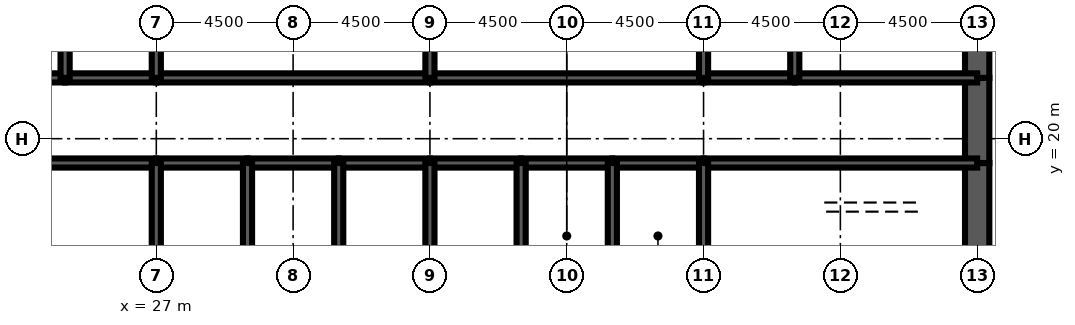
"""IFC4 building model, lengths in metres.
Left out: names, types, materials, properties, quantities, classifications, styles, units other than length and angle.
Written with IfcOpenShell. Run it as: python <this file> out.ifc"""

import sys

from ifc_helpers import new_model, si_unit, direction, frame, frame_2d, origin, place, context, subcontext, project, spatial, rectangle, extrude, element, fill, save


model = new_model("IFC4")
c1 = context("Model", 3, precision=1e-05, world=origin(), true_north=direction((0.0, 1.0)))
c2 = subcontext(c1, "Body", "Model", "MODEL_VIEW")
j1 = project(units=[si_unit("LENGTHUNIT", "METRE"), si_unit("PLANEANGLEUNIT", "RADIAN")], contexts=[c1])
p1 = place(None, origin())
s1 = spatial("IfcSite", under=j1, at=p1, CompositionType="ELEMENT")
p2 = place(p1, origin())
s2 = spatial("IfcBuilding", under=s1, at=p2, CompositionType="ELEMENT")
p3 = place(p2, frame((0.0, 0.0, 202.6)))
s3 = spatial("IfcBuildingStorey", under=s2, at=p3, CompositionType="ELEMENT", Elevation=202.6)
p4 = place(p3, frame((54.0, 16.0, 0.0), z_axis=(0.0, 0.0, 1.0), x_axis=(0.0, 1.0, 0.0)))
e1 = element("IfcWall", 1, at=p4, inside=s3, PredefinedType="SHEAR", context=c2, shape_type="SweptSolid", body=[
    extrude(rectangle(XDim=3.2, YDim=0.8, at=frame_2d((1.6, 0.0))), origin(), (0.0, 0.0, 1.0), 4.2),
])
p5 = place(p3, frame((54.0, 19.2, 0.0), z_axis=(0.0, 0.0, 1.0), x_axis=(0.0, 1.0, 0.0)))
e2 = element("IfcWall", 2, at=p5, inside=s3, PredefinedType="SHEAR", context=c2, shape_type="SweptSolid", body=[
    extrude(rectangle(XDim=2.8, YDim=0.8, at=frame_2d((1.4, 0.0))), origin(), (0.0, 0.0, 1.0), 4.2),
])
p6 = place(p5, frame((0.4, 0.0, 0.0)))
e3 = element("IfcOpeningElement", 3, at=p6, cuts=e2, PredefinedType="OPENING", context=c2, shape_type="SweptSolid", body=[
    extrude(rectangle(XDim=1.8, YDim=2.1, at=frame_2d((0.9, 1.05))), frame((0.0, 0.41, 0.0), z_axis=(0.0, -1.0, 0.0), x_axis=(1.0, 0.0, 0.0)), (0.0, 0.0, 1.0), 0.82),
])
p7 = place(p3, frame((54.0, 22.0, 0.0), z_axis=(0.0, 0.0, 1.0), x_axis=(0.0, 1.0, 0.0)))
e4 = element("IfcWall", 4, at=p7, inside=s3, PredefinedType="SHEAR", context=c2, shape_type="SweptSolid", body=[
    extrude(rectangle(XDim=4.0, YDim=0.8, at=frame_2d((2.0, 0.0))), origin(), (0.0, 0.0, 1.0), 4.2),
])
p8 = place(p3, frame((18.0, 19.2, 0.0), z_axis=(0.0, 0.0, 1.0), x_axis=(1.0, 0.0, 0.0)))
e5 = element("IfcWall", 5, at=p8, inside=s3, PredefinedType="SOLIDWALL", context=c2, shape_type="SweptSolid", body=[
    extrude(rectangle(XDim=9.0, YDim=0.3, at=frame_2d((4.5, 0.0))), origin(), (0.0, 0.0, 1.0), 4.2),
])
p9 = place(p8, frame((0.65, 0.0, 0.0)))
e6 = element("IfcOpeningElement", 6, at=p9, cuts=e5, PredefinedType="OPENING", context=c2, shape_type="SweptSolid", body=[
    extrude(rectangle(XDim=1.0, YDim=2.1, at=frame_2d((0.5, 1.05))), frame((0.0, 0.16, 0.0), z_axis=(0.0, -1.0, 0.0), x_axis=(1.0, 0.0, 0.0)), (0.0, 0.0, 1.0), 0.32),
])
p10 = place(p3, frame((27.0, 19.2, 0.0), z_axis=(0.0, 0.0, 1.0), x_axis=(1.0, 0.0, 0.0)))
e7 = element("IfcWall", 7, at=p10, inside=s3, PredefinedType="SOLIDWALL", context=c2, shape_type="SweptSolid", body=[
    extrude(rectangle(XDim=3.0, YDim=0.3, at=frame_2d((1.5, 0.0))), origin(), (0.0, 0.0, 1.0), 4.2),
])
p11 = place(p10, frame((0.95, 0.0, 0.0)))
e8 = element("IfcOpeningElement", 8, at=p11, cuts=e7, PredefinedType="OPENING", context=c2, shape_type="SweptSolid", body=[
    extrude(rectangle(XDim=1.1, YDim=2.2, at=frame_2d((0.55, 1.1))), frame((0.0, 0.16, 0.0), z_axis=(0.0, -1.0, 0.0), x_axis=(1.0, 0.0, 0.0)), (0.0, 0.0, 1.0), 0.32),
])
p12 = place(p3, frame((30.0, 19.2, 0.0), z_axis=(0.0, 0.0, 1.0), x_axis=(1.0, 0.0, 0.0)))
e9 = element("IfcWall", 9, at=p12, inside=s3, PredefinedType="SOLIDWALL", context=c2, shape_type="SweptSolid", body=[
    extrude(rectangle(XDim=3.0, YDim=0.3, at=frame_2d((1.5, 0.0))), origin(), (0.0, 0.0, 1.0), 4.2),
])
p13 = place(p12, frame((0.95, 0.0, 0.0)))
e10 = element("IfcOpeningElement", 10, at=p13, cuts=e9, PredefinedType="OPENING", context=c2, shape_type="SweptSolid", body=[
    extrude(rectangle(XDim=1.1, YDim=2.2, at=frame_2d((0.55, 1.1))), frame((0.0, 0.16, 0.0), z_axis=(0.0, -1.0, 0.0), x_axis=(1.0, 0.0, 0.0)), (0.0, 0.0, 1.0), 0.32),
])
p14 = place(p3, frame((33.0, 19.2, 0.0), z_axis=(0.0, 0.0, 1.0), x_axis=(1.0, 0.0, 0.0)))
e11 = element("IfcWall", 11, at=p14, inside=s3, PredefinedType="SOLIDWALL", context=c2, shape_type="SweptSolid", body=[
    extrude(rectangle(XDim=3.0, YDim=0.3, at=frame_2d((1.5, 0.0))), origin(), (0.0, 0.0, 1.0), 4.2),
])
p15 = place(p14, frame((0.95, 0.0, 0.0)))
e12 = element("IfcOpeningElement", 12, at=p15, cuts=e11, PredefinedType="OPENING", context=c2, shape_type="SweptSolid", body=[
    extrude(rectangle(XDim=1.1, YDim=2.2, at=frame_2d((0.55, 1.1))), frame((0.0, 0.16, 0.0), z_axis=(0.0, -1.0, 0.0), x_axis=(1.0, 0.0, 0.0)), (0.0, 0.0, 1.0), 0.32),
])
p16 = place(p3, frame((36.0, 19.2, 0.0), z_axis=(0.0, 0.0, 1.0), x_axis=(1.0, 0.0, 0.0)))
e13 = element("IfcWall", 13, at=p16, inside=s3, PredefinedType="SOLIDWALL", context=c2, shape_type="SweptSolid", body=[
    extrude(rectangle(XDim=3.0, YDim=0.3, at=frame_2d((1.5, 0.0))), origin(), (0.0, 0.0, 1.0), 4.2),
])
p17 = place(p16, frame((0.95, 0.0, 0.0)))
e14 = element("IfcOpeningElement", 14, at=p17, cuts=e13, PredefinedType="OPENING", context=c2, shape_type="SweptSolid", body=[
    extrude(rectangle(XDim=1.1, YDim=2.2, at=frame_2d((0.55, 1.1))), frame((0.0, 0.16, 0.0), z_axis=(0.0, -1.0, 0.0), x_axis=(1.0, 0.0, 0.0)), (0.0, 0.0, 1.0), 0.32),
])
p18 = place(p3, frame((39.0, 19.2, 0.0), z_axis=(0.0, 0.0, 1.0), x_axis=(1.0, 0.0, 0.0)))
e15 = element("IfcWall", 15, at=p18, inside=s3, PredefinedType="SOLIDWALL", context=c2, shape_type="SweptSolid", body=[
    extrude(rectangle(XDim=3.0, YDim=0.3, at=frame_2d((1.5, 0.0))), origin(), (0.0, 0.0, 1.0), 4.2),
])
p19 = place(p18, frame((1.0, 0.0, 0.0)))
e16 = element("IfcOpeningElement", 16, at=p19, cuts=e15, PredefinedType="OPENING", context=c2, shape_type="SweptSolid", body=[
    extrude(rectangle(XDim=1.0, YDim=2.1, at=frame_2d((0.5, 1.05))), frame((0.0, 0.16, 0.0), z_axis=(0.0, -1.0, 0.0), x_axis=(1.0, 0.0, 0.0)), (0.0, 0.0, 1.0), 0.32),
])
p20 = place(p3, frame((42.0, 19.2, 0.0), z_axis=(0.0, 0.0, 1.0), x_axis=(1.0, 0.0, 0.0)))
e17 = element("IfcWall", 17, at=p20, inside=s3, PredefinedType="SOLIDWALL", context=c2, shape_type="SweptSolid", body=[
    extrude(rectangle(XDim=3.0, YDim=0.3, at=frame_2d((1.5, 0.0))), origin(), (0.0, 0.0, 1.0), 4.2),
])
p21 = place(p20, frame((1.0, 0.0, 0.0)))
e18 = element("IfcOpeningElement", 18, at=p21, cuts=e17, PredefinedType="OPENING", context=c2, shape_type="SweptSolid", body=[
    extrude(rectangle(XDim=1.0, YDim=2.1, at=frame_2d((0.5, 1.05))), frame((0.0, 0.16, 0.0), z_axis=(0.0, -1.0, 0.0), x_axis=(1.0, 0.0, 0.0)), (0.0, 0.0, 1.0), 0.32),
])
p22 = place(p3, frame((45.0, 19.2, 0.0), z_axis=(0.0, 0.0, 1.0), x_axis=(1.0, 0.0, 0.0)))
e19 = element("IfcWall", 19, at=p22, inside=s3, PredefinedType="SOLIDWALL", context=c2, shape_type="SweptSolid", body=[
    extrude(rectangle(XDim=9.0, YDim=0.3, at=frame_2d((4.5, 0.0))), origin(), (0.0, 0.0, 1.0), 4.2),
])
p23 = place(p22, frame((7.35, 0.0, 0.0)))
e20 = element("IfcOpeningElement", 20, at=p23, cuts=e19, PredefinedType="OPENING", context=c2, shape_type="SweptSolid", body=[
    extrude(rectangle(XDim=1.0, YDim=2.1, at=frame_2d((0.5, 1.05))), frame((0.0, 0.16, 0.0), z_axis=(0.0, -1.0, 0.0), x_axis=(1.0, 0.0, 0.0)), (0.0, 0.0, 1.0), 0.32),
])
p24 = place(p3, frame((18.0, 22.0, 0.0), z_axis=(0.0, 0.0, 1.0), x_axis=(1.0, 0.0, 0.0)))
e21 = element("IfcWall", 21, at=p24, inside=s3, PredefinedType="SOLIDWALL", context=c2, shape_type="SweptSolid", body=[
    extrude(rectangle(XDim=6.0, YDim=0.3, at=frame_2d((3.0, 0.0))), origin(), (0.0, 0.0, 1.0), 4.2),
])
p25 = place(p24, frame((4.4, 0.0, 0.0)))
e22 = element("IfcOpeningElement", 22, at=p25, cuts=e21, PredefinedType="OPENING", context=c2, shape_type="SweptSolid", body=[
    extrude(rectangle(XDim=1.0, YDim=2.1, at=frame_2d((0.5, 1.05))), frame((0.0, 0.16, 0.0), z_axis=(0.0, -1.0, 0.0), x_axis=(1.0, 0.0, 0.0)), (0.0, 0.0, 1.0), 0.32),
])
p26 = place(p24, frame((0.65, 0.0, 0.0)))
e23 = element("IfcOpeningElement", 23, at=p26, cuts=e21, PredefinedType="OPENING", context=c2, shape_type="SweptSolid", body=[
    extrude(rectangle(XDim=1.0, YDim=2.1, at=frame_2d((0.5, 1.05))), frame((0.0, 0.16, 0.0), z_axis=(0.0, -1.0, 0.0), x_axis=(1.0, 0.0, 0.0)), (0.0, 0.0, 1.0), 0.32),
])
p27 = place(p3, frame((24.0, 22.0, 0.0), z_axis=(0.0, 0.0, 1.0), x_axis=(1.0, 0.0, 0.0)))
e24 = element("IfcWall", 24, at=p27, inside=s3, PredefinedType="SOLIDWALL", context=c2, shape_type="SweptSolid", body=[
    extrude(rectangle(XDim=3.0, YDim=0.3, at=frame_2d((1.5, 0.0))), origin(), (0.0, 0.0, 1.0), 4.2),
])
p28 = place(p27, frame((1.0, 0.0, 0.0)))
e25 = element("IfcOpeningElement", 25, at=p28, cuts=e24, PredefinedType="OPENING", context=c2, shape_type="SweptSolid", body=[
    extrude(rectangle(XDim=1.0, YDim=2.1, at=frame_2d((0.5, 1.05))), frame((0.0, 0.16, 0.0), z_axis=(0.0, -1.0, 0.0), x_axis=(1.0, 0.0, 0.0)), (0.0, 0.0, 1.0), 0.32),
])
p29 = place(p3, frame((27.0, 22.0, 0.0), z_axis=(0.0, 0.0, 1.0), x_axis=(1.0, 0.0, 0.0)))
e26 = element("IfcWall", 26, at=p29, inside=s3, PredefinedType="SOLIDWALL", context=c2, shape_type="SweptSolid", body=[
    extrude(rectangle(XDim=9.0, YDim=0.3, at=frame_2d((4.5, 0.0))), origin(), (0.0, 0.0, 1.0), 4.2),
])
p30 = place(p29, frame((4.0, 0.0, 0.0)))
e27 = element("IfcOpeningElement", 27, at=p30, cuts=e26, PredefinedType="OPENING", context=c2, shape_type="SweptSolid", body=[
    extrude(rectangle(XDim=1.0, YDim=2.1, at=frame_2d((0.5, 1.05))), frame((0.0, 0.16, 0.0), z_axis=(0.0, -1.0, 0.0), x_axis=(1.0, 0.0, 0.0)), (0.0, 0.0, 1.0), 0.32),
])
p31 = place(p3, frame((36.0, 22.0, 0.0), z_axis=(0.0, 0.0, 1.0), x_axis=(1.0, 0.0, 0.0)))
e28 = element("IfcWall", 28, at=p31, inside=s3, PredefinedType="SOLIDWALL", context=c2, shape_type="SweptSolid", body=[
    extrude(rectangle(XDim=9.0, YDim=0.3, at=frame_2d((4.5, 0.0))), origin(), (0.0, 0.0, 1.0), 4.2),
])
p32 = place(p31, frame((4.0, 0.0, 0.0)))
e29 = element("IfcOpeningElement", 29, at=p32, cuts=e28, PredefinedType="OPENING", context=c2, shape_type="SweptSolid", body=[
    extrude(rectangle(XDim=1.0, YDim=2.1, at=frame_2d((0.5, 1.05))), frame((0.0, 0.16, 0.0), z_axis=(0.0, -1.0, 0.0), x_axis=(1.0, 0.0, 0.0)), (0.0, 0.0, 1.0), 0.32),
])
p33 = place(p3, frame((45.0, 22.0, 0.0), z_axis=(0.0, 0.0, 1.0), x_axis=(1.0, 0.0, 0.0)))
e30 = element("IfcWall", 30, at=p33, inside=s3, PredefinedType="SOLIDWALL", context=c2, shape_type="SweptSolid", body=[
    extrude(rectangle(XDim=3.0, YDim=0.3, at=frame_2d((1.5, 0.0))), origin(), (0.0, 0.0, 1.0), 4.2),
])
p34 = place(p33, frame((1.0, 0.0, 0.0)))
e31 = element("IfcOpeningElement", 31, at=p34, cuts=e30, PredefinedType="OPENING", context=c2, shape_type="SweptSolid", body=[
    extrude(rectangle(XDim=1.0, YDim=2.1, at=frame_2d((0.5, 1.05))), frame((0.0, 0.16, 0.0), z_axis=(0.0, -1.0, 0.0), x_axis=(1.0, 0.0, 0.0)), (0.0, 0.0, 1.0), 0.32),
])
p35 = place(p3, frame((48.0, 22.0, 0.0), z_axis=(0.0, 0.0, 1.0), x_axis=(1.0, 0.0, 0.0)))
e32 = element("IfcWall", 32, at=p35, inside=s3, PredefinedType="SOLIDWALL", context=c2, shape_type="SweptSolid", body=[
    extrude(rectangle(XDim=6.0, YDim=0.3, at=frame_2d((3.0, 0.0))), origin(), (0.0, 0.0, 1.0), 4.2),
])
p36 = place(p35, frame((2.0, 0.0, 0.0)))
e33 = element("IfcOpeningElement", 33, at=p36, cuts=e32, PredefinedType="OPENING", context=c2, shape_type="SweptSolid", body=[
    extrude(rectangle(XDim=1.0, YDim=2.1, at=frame_2d((0.5, 1.05))), frame((0.0, 0.16, 0.0), z_axis=(0.0, -1.0, 0.0), x_axis=(1.0, 0.0, 0.0)), (0.0, 0.0, 1.0), 0.32),
])
p37 = place(p35, frame((4.35, 0.0, 0.0)))
e34 = element("IfcOpeningElement", 34, at=p37, cuts=e32, PredefinedType="OPENING", context=c2, shape_type="SweptSolid", body=[
    extrude(rectangle(XDim=1.0, YDim=2.1, at=frame_2d((0.5, 1.05))), frame((0.0, 0.16, 0.0), z_axis=(0.0, -1.0, 0.0), x_axis=(1.0, 0.0, 0.0)), (0.0, 0.0, 1.0), 0.32),
])
for number, where, z_axis, x_axis in (
    (35, (27.0, 16.0, 0.0), (0.0, 0.0, 1.0), (0.0, 1.0, 0.0)),
    (36, (30.0, 16.0, 0.0), (0.0, 0.0, 1.0), (0.0, 1.0, 0.0)),
    (37, (33.0, 16.0, 0.0), (0.0, 0.0, 1.0), (0.0, 1.0, 0.0)),
    (38, (36.0, 16.0, 0.0), (0.0, 0.0, 1.0), (0.0, 1.0, 0.0)),
    (39, (39.0, 16.0, 0.0), (0.0, 0.0, 1.0), (0.0, 1.0, 0.0)),
    (40, (42.0, 16.0, 0.0), (0.0, 0.0, 1.0), (0.0, 1.0, 0.0)),
    (41, (45.0, 16.0, 0.0), (0.0, 0.0, 1.0), (0.0, 1.0, 0.0)),
):
    element("IfcWall", number, at=place(p3, frame(where, z_axis=z_axis, x_axis=x_axis)), inside=s3, PredefinedType="SOLIDWALL", context=c2, shape_type="SweptSolid", body=[
        extrude(rectangle(XDim=3.2, YDim=0.3, at=frame_2d((1.6, 0.0))), origin(), (0.0, 0.0, 1.0), 4.2),
    ])
for number, where, z_axis, x_axis in (
    (42, (24.0, 22.0, 0.0), (0.0, 0.0, 1.0), (0.0, 1.0, 0.0)),
    (43, (27.0, 22.0, 0.0), (0.0, 0.0, 1.0), (0.0, 1.0, 0.0)),
    (44, (36.0, 22.0, 0.0), (0.0, 0.0, 1.0), (0.0, 1.0, 0.0)),
    (45, (45.0, 22.0, 0.0), (0.0, 0.0, 1.0), (0.0, 1.0, 0.0)),
    (46, (48.0, 22.0, 0.0), (0.0, 0.0, 1.0), (0.0, 1.0, 0.0)),
):
    element("IfcWall", number, at=place(p3, frame(where, z_axis=z_axis, x_axis=x_axis)), inside=s3, PredefinedType="SOLIDWALL", context=c2, shape_type="SweptSolid", body=[
        extrude(rectangle(XDim=4.0, YDim=0.3, at=frame_2d((2.0, 0.0))), origin(), (0.0, 0.0, 1.0), 4.2),
    ])
p38 = place(p3, frame((39.15, 17.35, 0.0), z_axis=(0.0, 0.0, 1.0), x_axis=(1.0, 0.0, 0.0)))
e47 = element("IfcWall", 47, at=p38, inside=s3, PredefinedType="SOLIDWALL", context=c2, shape_type="SweptSolid", body=[
    extrude(rectangle(XDim=2.7, YDim=0.3, at=frame_2d((1.35, 0.0))), origin(), (0.0, 0.0, 1.0), 4.04),
])
p39 = place(p38, frame((0.85, 0.0, 0.0)))
e48 = element("IfcOpeningElement", 48, at=p39, cuts=e47, PredefinedType="OPENING", context=c2, shape_type="SweptSolid", body=[
    extrude(rectangle(XDim=1.0, YDim=2.1, at=frame_2d((0.5, 1.05))), frame((0.0, 0.16, 0.0), z_axis=(0.0, -1.0, 0.0), x_axis=(1.0, 0.0, 0.0)), (0.0, 0.0, 1.0), 0.32),
])
p40 = place(p3, frame((42.15, 17.35, 0.0), z_axis=(0.0, 0.0, 1.0), x_axis=(1.0, 0.0, 0.0)))
e49 = element("IfcWall", 49, at=p40, inside=s3, PredefinedType="SOLIDWALL", context=c2, shape_type="SweptSolid", body=[
    extrude(rectangle(XDim=2.7, YDim=0.3, at=frame_2d((1.35, 0.0))), origin(), (0.0, 0.0, 1.0), 4.04),
])
p41 = place(p40, frame((0.85, 0.0, 0.0)))
e50 = element("IfcOpeningElement", 50, at=p41, cuts=e49, PredefinedType="OPENING", context=c2, shape_type="SweptSolid", body=[
    extrude(rectangle(XDim=1.0, YDim=2.1, at=frame_2d((0.5, 1.05))), frame((0.0, 0.16, 0.0), z_axis=(0.0, -1.0, 0.0), x_axis=(1.0, 0.0, 0.0)), (0.0, 0.0, 1.0), 0.32),
])
p42 = place(p3, frame((42.5, 22.15, 0.0), z_axis=(0.0, 0.0, 1.0), x_axis=(0.0, 1.0, 0.0)))
e51 = element("IfcWall", 51, at=p42, inside=s3, PredefinedType="PARTITIONING", context=c2, shape_type="SweptSolid", body=[
    extrude(rectangle(XDim=3.7, YDim=0.15, at=frame_2d((1.85, 0.0))), origin(), (0.0, 0.0, 1.0), 3.0),
])
p43 = place(p42, frame((2.2, 0.0, 0.0)))
e52 = element("IfcOpeningElement", 52, at=p43, cuts=e51, PredefinedType="OPENING", context=c2, shape_type="SweptSolid", body=[
    extrude(rectangle(XDim=1.0, YDim=2.1, at=frame_2d((0.5, 1.05))), frame((0.0, 0.085, 0.0), z_axis=(0.0, -1.0, 0.0), x_axis=(1.0, 0.0, 0.0)), (0.0, 0.0, 1.0), 0.17),
])
p44 = place(p3, frame((52.025, 22.15, 0.0), z_axis=(0.0, 0.0, 1.0), x_axis=(0.0, 1.0, 0.0)))
e53 = element("IfcWall", 53, at=p44, inside=s3, PredefinedType="PARTITIONING", context=c2, shape_type="SweptSolid", body=[
    extrude(rectangle(XDim=3.7, YDim=0.15, at=frame_2d((1.85, 0.0))), origin(), (0.0, 0.0, 1.0), 3.0),
])
p45 = place(p3, frame((24.5, 19.35, 0.0), z_axis=(0.0, 0.0, 1.0), x_axis=(0.0, 1.0, 0.0)))
e54 = element("IfcWall", 54, at=p45, inside=s3, PredefinedType="PARTITIONING", context=c2, shape_type="SweptSolid", body=[
    extrude(rectangle(XDim=2.5, YDim=0.15, at=frame_2d((1.25, 0.0))), origin(), (0.0, 0.0, 1.0), 3.0),
])
p46 = place(p45, frame((1.15, 0.0, 0.0)))
e55 = element("IfcOpeningElement", 55, at=p46, cuts=e54, PredefinedType="OPENING", context=c2, shape_type="SweptSolid", body=[
    extrude(rectangle(XDim=1.0, YDim=2.1, at=frame_2d((0.5, 1.05))), frame((0.0, 0.085, 0.0), z_axis=(0.0, -1.0, 0.0), x_axis=(1.0, 0.0, 0.0)), (0.0, 0.0, 1.0), 0.17),
])
p47 = place(p39, origin())
e56 = element("IfcDoor", 56, at=p47, inside=s3, OperationType="SINGLE_SWING_LEFT", PredefinedType="DOOR", context=c2, shape_type="SweptSolid", body=[
    extrude(rectangle(XDim=1.0, YDim=2.1, at=frame_2d((0.5, 1.05))), frame((0.0, 0.025, 0.0), z_axis=(0.0, -1.0, 0.0), x_axis=(1.0, 0.0, 0.0)), (0.0, 0.0, 1.0), 0.05),
])
fill(e48, e56)
p48 = place(p41, origin())
e57 = element("IfcDoor", 57, at=p48, inside=s3, OperationType="SINGLE_SWING_LEFT", PredefinedType="DOOR", context=c2, shape_type="SweptSolid", body=[
    extrude(rectangle(XDim=1.0, YDim=2.1, at=frame_2d((0.5, 1.05))), frame((0.0, 0.025, 0.0), z_axis=(0.0, -1.0, 0.0), x_axis=(1.0, 0.0, 0.0)), (0.0, 0.0, 1.0), 0.05),
])
fill(e50, e57)
p49 = place(p46, origin())
e58 = element("IfcDoor", 58, at=p49, inside=s3, OperationType="SINGLE_SWING_RIGHT", PredefinedType="DOOR", context=c2, shape_type="SweptSolid", body=[
    extrude(rectangle(XDim=1.0, YDim=2.1, at=frame_2d((0.5, 1.05))), frame((0.0, 0.025, 0.0), z_axis=(0.0, -1.0, 0.0), x_axis=(1.0, 0.0, 0.0)), (0.0, 0.0, 1.0), 0.05),
])
fill(e55, e58)
p50 = place(p11, origin())
e59 = element("IfcDoor", 59, at=p50, inside=s3, OperationType="DOUBLE_DOOR_SLIDING", PredefinedType="USERDEFINED", context=c2, shape_type="SweptSolid", body=[
    extrude(rectangle(XDim=1.1, YDim=2.2, at=frame_2d((0.55, 1.1))), frame((0.0, 0.025, 0.0), z_axis=(0.0, -1.0, 0.0), x_axis=(1.0, 0.0, 0.0)), (0.0, 0.0, 1.0), 0.05),
])
fill(e8, e59)
p51 = place(p13, origin())
e60 = element("IfcDoor", 60, at=p51, inside=s3, OperationType="DOUBLE_DOOR_SLIDING", PredefinedType="USERDEFINED", context=c2, shape_type="SweptSolid", body=[
    extrude(rectangle(XDim=1.1, YDim=2.2, at=frame_2d((0.55, 1.1))), frame((0.0, 0.025, 0.0), z_axis=(0.0, -1.0, 0.0), x_axis=(1.0, 0.0, 0.0)), (0.0, 0.0, 1.0), 0.05),
])
fill(e10, e60)
p52 = place(p15, origin())
e61 = element("IfcDoor", 61, at=p52, inside=s3, OperationType="DOUBLE_DOOR_SLIDING", PredefinedType="USERDEFINED", context=c2, shape_type="SweptSolid", body=[
    extrude(rectangle(XDim=1.1, YDim=2.2, at=frame_2d((0.55, 1.1))), frame((0.0, 0.025, 0.0), z_axis=(0.0, -1.0, 0.0), x_axis=(1.0, 0.0, 0.0)), (0.0, 0.0, 1.0), 0.05),
])
fill(e12, e61)
p53 = place(p17, origin())
e62 = element("IfcDoor", 62, at=p53, inside=s3, OperationType="DOUBLE_DOOR_SLIDING", PredefinedType="USERDEFINED", context=c2, shape_type="SweptSolid", body=[
    extrude(rectangle(XDim=1.1, YDim=2.2, at=frame_2d((0.55, 1.1))), frame((0.0, 0.025, 0.0), z_axis=(0.0, -1.0, 0.0), x_axis=(1.0, 0.0, 0.0)), (0.0, 0.0, 1.0), 0.05),
])
fill(e14, e62)
p54 = place(p23, origin())
e63 = element("IfcDoor", 63, at=p54, inside=s3, OperationType="SINGLE_SWING_RIGHT", PredefinedType="DOOR", context=c2, shape_type="SweptSolid", body=[
    extrude(rectangle(XDim=1.0, YDim=2.1, at=frame_2d((0.5, 1.05))), frame((0.0, 0.025, 0.0), z_axis=(0.0, -1.0, 0.0), x_axis=(1.0, 0.0, 0.0)), (0.0, 0.0, 1.0), 0.05),
])
fill(e20, e63)
p55 = place(p6, origin())
e64 = element("IfcDoor", 64, at=p55, inside=s3, OperationType="SINGLE_SWING_LEFT", PredefinedType="DOOR", context=c2, shape_type="SweptSolid", body=[
    extrude(rectangle(XDim=1.8, YDim=2.1, at=frame_2d((0.9, 1.05))), frame((0.0, 0.4, 0.0), z_axis=(0.0, -1.0, 0.0), x_axis=(1.0, 0.0, 0.0)), (0.0, 0.0, 1.0), 0.8),
])
fill(e3, e64)
p56 = place(p28, origin())
e65 = element("IfcDoor", 65, at=p56, inside=s3, OperationType="SINGLE_SWING_LEFT", PredefinedType="DOOR", context=c2, shape_type="SweptSolid", body=[
    extrude(rectangle(XDim=1.0, YDim=2.1, at=frame_2d((0.5, 1.05))), frame((0.0, 0.025, 0.0), z_axis=(0.0, -1.0, 0.0), x_axis=(1.0, 0.0, 0.0)), (0.0, 0.0, 1.0), 0.05),
])
fill(e25, e65)
p57 = place(p30, origin())
e66 = element("IfcDoor", 66, at=p57, inside=s3, OperationType="SINGLE_SWING_LEFT", PredefinedType="DOOR", context=c2, shape_type="SweptSolid", body=[
    extrude(rectangle(XDim=1.0, YDim=2.1, at=frame_2d((0.5, 1.05))), frame((0.0, 0.025, 0.0), z_axis=(0.0, -1.0, 0.0), x_axis=(1.0, 0.0, 0.0)), (0.0, 0.0, 1.0), 0.05),
])
fill(e27, e66)
p58 = place(p32, origin())
e67 = element("IfcDoor", 67, at=p58, inside=s3, OperationType="SINGLE_SWING_LEFT", PredefinedType="DOOR", context=c2, shape_type="SweptSolid", body=[
    extrude(rectangle(XDim=1.0, YDim=2.1, at=frame_2d((0.5, 1.05))), frame((0.0, 0.025, 0.0), z_axis=(0.0, -1.0, 0.0), x_axis=(1.0, 0.0, 0.0)), (0.0, 0.0, 1.0), 0.05),
])
fill(e29, e67)
p59 = place(p34, origin())
e68 = element("IfcDoor", 68, at=p59, inside=s3, OperationType="SINGLE_SWING_LEFT", PredefinedType="DOOR", context=c2, shape_type="SweptSolid", body=[
    extrude(rectangle(XDim=1.0, YDim=2.1, at=frame_2d((0.5, 1.05))), frame((0.0, 0.025, 0.0), z_axis=(0.0, -1.0, 0.0), x_axis=(1.0, 0.0, 0.0)), (0.0, 0.0, 1.0), 0.05),
])
fill(e31, e68)
p60 = place(p36, origin())
e69 = element("IfcDoor", 69, at=p60, inside=s3, OperationType="SINGLE_SWING_LEFT", PredefinedType="DOOR", context=c2, shape_type="SweptSolid", body=[
    extrude(rectangle(XDim=1.0, YDim=2.1, at=frame_2d((0.5, 1.05))), frame((0.0, 0.025, 0.0), z_axis=(0.0, -1.0, 0.0), x_axis=(1.0, 0.0, 0.0)), (0.0, 0.0, 1.0), 0.05),
])
fill(e33, e69)
p61 = place(p37, origin())
e70 = element("IfcDoor", 70, at=p61, inside=s3, OperationType="SINGLE_SWING_RIGHT", PredefinedType="DOOR", context=c2, shape_type="SweptSolid", body=[
    extrude(rectangle(XDim=1.0, YDim=2.1, at=frame_2d((0.5, 1.05))), frame((0.0, 0.025, 0.0), z_axis=(0.0, -1.0, 0.0), x_axis=(1.0, 0.0, 0.0)), (0.0, 0.0, 1.0), 0.05),
])
fill(e34, e70)
p62 = place(p19, origin())
e71 = element("IfcDoor", 71, at=p62, inside=s3, OperationType="SINGLE_SWING_LEFT", PredefinedType="DOOR", context=c2, shape_type="SweptSolid", body=[
    extrude(rectangle(XDim=1.0, YDim=2.1, at=frame_2d((0.5, 1.05))), frame((0.0, 0.025, 0.0), z_axis=(0.0, -1.0, 0.0), x_axis=(1.0, 0.0, 0.0)), (0.0, 0.0, 1.0), 0.05),
])
fill(e16, e71)
p63 = place(p21, origin())
e72 = element("IfcDoor", 72, at=p63, inside=s3, OperationType="SINGLE_SWING_LEFT", PredefinedType="DOOR", context=c2, shape_type="SweptSolid", body=[
    extrude(rectangle(XDim=1.0, YDim=2.1, at=frame_2d((0.5, 1.05))), frame((0.0, 0.025, 0.0), z_axis=(0.0, -1.0, 0.0), x_axis=(1.0, 0.0, 0.0)), (0.0, 0.0, 1.0), 0.05),
])
fill(e18, e72)
save(model, sys.argv[1])
